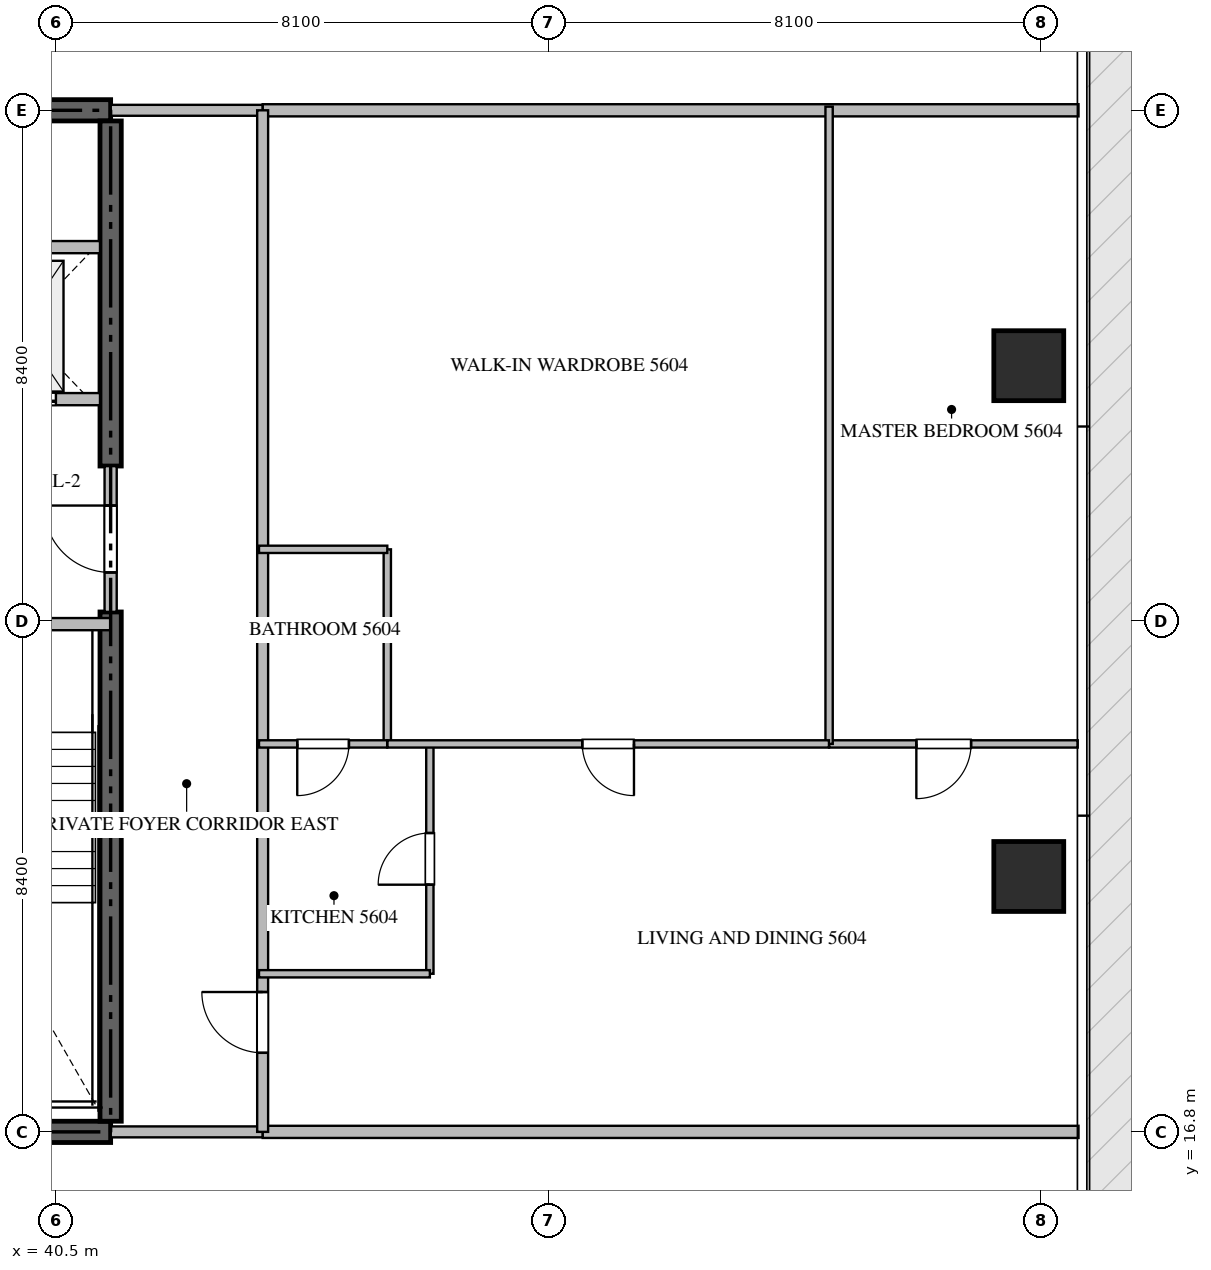
"""IFC4 building model, lengths in metres.
Left out: names, types, materials, properties, quantities, classifications, styles, units other than length and angle.
Written with IfcOpenShell. Run it as: python <this file> out.ifc"""

import sys

from ifc_helpers import new_model, si_unit, direction, frame, frame_2d, origin, origin_2d, place, context, subcontext, project, spatial, rectangle, extrude, source, transform, mapped, element, fill, save


model = new_model("IFC4")
c1 = context("Model", 3, precision=1e-05, world=origin(), true_north=direction((0.0, 1.0)))
c2 = subcontext(c1, "Body", "Model", "MODEL_VIEW")
j1 = project(units=[si_unit("LENGTHUNIT", "METRE"), si_unit("PLANEANGLEUNIT", "RADIAN")], contexts=[c1])
p1 = place(None, origin())
s1 = spatial("IfcSite", under=j1, at=p1, CompositionType="ELEMENT")
p2 = place(p1, origin())
s2 = spatial("IfcBuilding", under=s1, at=p2, CompositionType="ELEMENT")
p3 = place(p2, frame((0.0, 0.0, 225.85)))
s3 = spatial("IfcBuildingStorey", under=s2, at=p3, CompositionType="ELEMENT", Elevation=225.85)
for number, where, z_axis, x_axis in (
    (1, (23.4, 16.8, -0.26), (0.0, 0.0, 1.0), (1.0, 0.0, 0.0)),
    (2, (41.4, 33.6, -0.26), (0.0, 0.0, 1.0), (-1.0, 0.0, 0.0)),
):
    element("IfcWall", number, at=place(p3, frame(where, z_axis=z_axis, x_axis=x_axis)), inside=s3, PredefinedType="SHEAR", context=c2, shape_type="SweptSolid", body=[
        extrude(rectangle(XDim=18.0, YDim=0.35, at=frame_2d((9.0, 0.0))), origin(), (0.0, 0.0, 1.0), 3.848),
    ])
p4 = place(p3, frame((41.4, 16.975, -0.26), z_axis=(0.0, 0.0, 1.0), x_axis=(0.0, 1.0, 0.0)))
e3 = element("IfcWall", 3, at=p4, inside=s3, PredefinedType="SHEAR", context=c2, shape_type="SweptSolid", body=[
    extrude(rectangle(XDim=8.375, YDim=0.35, at=frame_2d((4.188, 0.0))), origin(), (0.0, 0.0, 1.0), 3.848),
])
p5 = place(p3, frame((41.4, 27.75, -0.26), z_axis=(0.0, 0.0, 1.0), x_axis=(0.0, 1.0, 0.0)))
e4 = element("IfcWall", 4, at=p5, inside=s3, PredefinedType="SHEAR", context=c2, shape_type="SweptSolid", body=[
    extrude(rectangle(XDim=5.675, YDim=0.35, at=frame_2d((2.837, 0.0))), origin(), (0.0, 0.0, 1.0), 3.848),
])
m1 = source(origin(), c2, "Body", "SweptSolid", [
    extrude(rectangle(XDim=1.15, YDim=1.15, at=origin_2d()), origin(), (0.0, 0.0, 1.0), 3.85),
])
for number, where, z_axis, x_axis in (
    (5, (56.5, 21.0, -0.26), (0.0, 0.0, 1.0), (1.0, 0.0, 0.0)),
    (6, (56.5, 29.4, -0.26), (0.0, 0.0, 1.0), (1.0, 0.0, 0.0)),
):
    element("IfcColumn", number, at=place(p3, frame(where, z_axis=z_axis, x_axis=x_axis)), inside=s3, PredefinedType="COLUMN", context=c2, shape_type="MappedRepresentation", body=[
        mapped(m1, transform((0.0, 0.0, 0.0), scale=1.0)),
    ])
p6 = place(p3, frame((36.95, 25.15, 0.0), z_axis=(0.0, 0.0, 1.0), x_axis=(1.0, 0.0, 0.0)))
e7 = element("IfcWall", 7, at=p6, inside=s3, PredefinedType="STANDARD", context=c2, shape_type="SweptSolid", body=[
    extrude(rectangle(XDim=4.45, YDim=0.2, at=frame_2d((2.225, 0.0))), origin(), (0.0, 0.0, 1.0), 3.59),
])
p7 = place(p6, frame((1.65, 0.0, 0.0)))
e8 = element("IfcOpeningElement", 8, at=p7, cuts=e7, PredefinedType="OPENING", context=c2, shape_type="SweptSolid", body=[
    extrude(rectangle(XDim=1.1, YDim=2.15, at=frame_2d((0.55, 1.075))), frame((0.0, 0.11, 0.0), z_axis=(0.0, -1.0, 0.0), x_axis=(1.0, 0.0, 0.0)), (0.0, 0.0, 1.0), 0.22),
])
p8 = place(p3, frame((38.75, 28.85, 0.0), z_axis=(0.0, 0.0, 1.0), x_axis=(1.0, 0.0, 0.0)))
e9 = element("IfcWall", 9, at=p8, inside=s3, PredefinedType="STANDARD", context=c2, shape_type="SweptSolid", body=[
    extrude(rectangle(XDim=2.475, YDim=0.2, at=frame_2d((1.238, 0.0))), origin(), (0.0, 0.0, 1.0), 3.59),
])
p9 = place(p8, frame((0.55, 0.0, 0.0)))
e10 = element("IfcOpeningElement", 10, at=p9, cuts=e9, PredefinedType="OPENING", context=c2, shape_type="SweptSolid", body=[
    extrude(rectangle(XDim=1.2, YDim=2.2, at=frame_2d((0.6, 1.1))), frame((0.0, 0.11, 0.0), z_axis=(0.0, -1.0, 0.0), x_axis=(1.0, 0.0, 0.0)), (0.0, 0.0, 1.0), 0.22),
])
p10 = place(p3, frame((38.75, 31.35, 0.0), z_axis=(0.0, 0.0, 1.0), x_axis=(1.0, 0.0, 0.0)))
e11 = element("IfcWall", 11, at=p10, inside=s3, PredefinedType="STANDARD", context=c2, shape_type="SweptSolid", body=[
    extrude(rectangle(XDim=2.475, YDim=0.2, at=frame_2d((1.238, 0.0))), origin(), (0.0, 0.0, 1.0), 3.59),
])
p11 = place(p3, frame((41.4, 25.352, 0.0), z_axis=(0.0, 0.0, 1.0), x_axis=(0.0, 1.0, 0.0)))
e12 = element("IfcWall", 12, at=p11, inside=s3, PredefinedType="STANDARD", context=c2, shape_type="SweptSolid", body=[
    extrude(rectangle(XDim=2.396, YDim=0.2, at=frame_2d((1.198, 0.0))), origin(), (0.0, 0.0, 1.0), 3.59),
])
p12 = place(p11, frame((0.648, 0.0, 0.0)))
e13 = element("IfcOpeningElement", 13, at=p12, cuts=e12, PredefinedType="OPENING", context=c2, shape_type="SweptSolid", body=[
    extrude(rectangle(XDim=1.1, YDim=2.15, at=frame_2d((0.55, 1.075))), frame((0.0, 0.11, 0.0), z_axis=(0.0, -1.0, 0.0), x_axis=(1.0, 0.0, 0.0)), (0.0, 0.0, 1.0), 0.22),
])
for number, where, z_axis, x_axis in (
    (14, (43.9, 16.8, 0.0), (0.0, 0.0, 1.0), (1.0, 0.0, 0.0)),
    (15, (43.9, 33.6, 0.0), (0.0, 0.0, 1.0), (1.0, 0.0, 0.0)),
):
    element("IfcWall", number, at=place(p3, frame(where, z_axis=z_axis, x_axis=x_axis)), inside=s3, PredefinedType="PARTITIONING", context=c2, shape_type="SweptSolid", body=[
        extrude(rectangle(XDim=13.418, YDim=0.2, at=frame_2d((6.709, 0.0))), origin(), (0.0, 0.0, 1.0), 3.59),
    ])
for number, where, z_axis, x_axis in (
    (16, (41.402, 16.8, 0.0), (0.0, 0.0, 1.0), (1.0, 0.0, 0.0)),
    (17, (41.402, 33.6, 0.0), (0.0, 0.0, 1.0), (1.0, 0.0, 0.0)),
):
    element("IfcWall", number, at=place(p3, frame(where, z_axis=z_axis, x_axis=x_axis)), inside=s3, PredefinedType="PARTITIONING", context=c2, shape_type="SweptSolid", body=[
        extrude(rectangle(XDim=2.496, YDim=0.18, at=frame_2d((1.248, 0.0))), origin(), (0.0, 0.0, 1.0), 3.59),
    ])
p13 = place(p3, frame((43.9, 16.8, 0.0), z_axis=(0.0, 0.0, 1.0), x_axis=(0.0, 1.0, 0.0)))
e18 = element("IfcWall", 18, at=p13, inside=s3, PredefinedType="PARTITIONING", context=c2, shape_type="SweptSolid", body=[
    extrude(rectangle(XDim=16.8, YDim=0.18, at=frame_2d((8.4, 0.0))), origin(), (0.0, 0.0, 1.0), 3.59),
])
p14 = place(p13, frame((1.3, 0.0, 0.0)))
e19 = element("IfcOpeningElement", 19, at=p14, cuts=e18, PredefinedType="OPENING", context=c2, shape_type="SweptSolid", body=[
    extrude(rectangle(XDim=1.0, YDim=2.15, at=frame_2d((0.5, 1.075))), frame((0.0, 0.1, 0.0), z_axis=(0.0, -1.0, 0.0), x_axis=(1.0, 0.0, 0.0)), (0.0, 0.0, 1.0), 0.2),
])
p15 = place(p3, frame((46.65, 19.4, 0.0), z_axis=(0.0, 0.0, 1.0), x_axis=(0.0, 1.0, 0.0)))
e20 = element("IfcWall", 20, at=p15, inside=s3, PredefinedType="PARTITIONING", context=c2, shape_type="SweptSolid", body=[
    extrude(rectangle(XDim=3.78, YDim=0.12, at=frame_2d((1.89, 0.0))), origin(), (0.0, 0.0, 1.0), 3.59),
])
p16 = place(p15, frame((1.465, 0.0, 0.0)))
e21 = element("IfcOpeningElement", 21, at=p16, cuts=e20, PredefinedType="OPENING", context=c2, shape_type="SweptSolid", body=[
    extrude(rectangle(XDim=0.85, YDim=2.1, at=frame_2d((0.425, 1.05))), frame((0.0, 0.07, 0.0), z_axis=(0.0, -1.0, 0.0), x_axis=(1.0, 0.0, 0.0)), (0.0, 0.0, 1.0), 0.14),
])
p17 = place(p3, frame((46.65, 19.4, 0.0), z_axis=(0.0, 0.0, 1.0), x_axis=(-1.0, 0.0, 0.0)))
e22 = element("IfcWall", 22, at=p17, inside=s3, PredefinedType="PARTITIONING", context=c2, shape_type="SweptSolid", body=[
    extrude(rectangle(XDim=2.81, YDim=0.12, at=frame_2d((1.405, 0.0))), origin(), (0.0, 0.0, 1.0), 3.59),
])
p18 = place(p3, frame((57.305, 23.18, 0.0), z_axis=(0.0, 0.0, 1.0), x_axis=(-1.0, 0.0, 0.0)))
e23 = element("IfcWall", 23, at=p18, inside=s3, PredefinedType="PARTITIONING", context=c2, shape_type="SweptSolid", body=[
    extrude(rectangle(XDim=4.089, YDim=0.12, at=frame_2d((2.044, 0.0))), origin(), (0.0, 0.0, 1.0), 3.59),
])
p19 = place(p18, frame((1.754, 0.0, 0.0)))
e24 = element("IfcOpeningElement", 24, at=p19, cuts=e23, PredefinedType="OPENING", context=c2, shape_type="SweptSolid", body=[
    extrude(rectangle(XDim=0.9, YDim=2.1, at=frame_2d((0.45, 1.05))), frame((0.0, 0.07, 0.0), z_axis=(0.0, -1.0, 0.0), x_axis=(1.0, 0.0, 0.0)), (0.0, 0.0, 1.0), 0.14),
])
p20 = place(p3, frame((53.216, 23.18, 0.0), z_axis=(0.0, 0.0, 1.0), x_axis=(0.0, 1.0, 0.0)))
e25 = element("IfcWall", 25, at=p20, inside=s3, PredefinedType="PARTITIONING", context=c2, shape_type="SweptSolid", body=[
    extrude(rectangle(XDim=10.48, YDim=0.12, at=frame_2d((5.24, 0.0))), origin(), (0.0, 0.0, 1.0), 3.59),
])
p21 = place(p3, frame((45.95, 23.18, 0.0), z_axis=(0.0, 0.0, 1.0), x_axis=(0.0, 1.0, 0.0)))
e26 = element("IfcWall", 26, at=p21, inside=s3, PredefinedType="PARTITIONING", context=c2, shape_type="SweptSolid", body=[
    extrude(rectangle(XDim=3.2, YDim=0.12, at=frame_2d((1.6, 0.0))), origin(), (0.0, 0.0, 1.0), 3.59),
])
p22 = place(p3, frame((45.95, 26.38, 0.0), z_axis=(0.0, 0.0, 1.0), x_axis=(-1.0, 0.0, 0.0)))
e27 = element("IfcWall", 27, at=p22, inside=s3, PredefinedType="PARTITIONING", context=c2, shape_type="SweptSolid", body=[
    extrude(rectangle(XDim=2.11, YDim=0.12, at=frame_2d((1.055, 0.0))), origin(), (0.0, 0.0, 1.0), 3.59),
])
p23 = place(p3, frame((53.214, 23.18, 0.0), z_axis=(0.0, 0.0, 1.0), x_axis=(-1.0, 0.0, 0.0)))
e28 = element("IfcWall", 28, at=p23, inside=s3, PredefinedType="PARTITIONING", context=c2, shape_type="SweptSolid", body=[
    extrude(rectangle(XDim=7.264, YDim=0.12, at=frame_2d((3.632, 0.0))), origin(), (0.0, 0.0, 1.0), 3.59),
])
p24 = place(p23, frame((3.207, 0.0, 0.0)))
e29 = element("IfcOpeningElement", 29, at=p24, cuts=e28, PredefinedType="OPENING", context=c2, shape_type="SweptSolid", body=[
    extrude(rectangle(XDim=0.85, YDim=2.1, at=frame_2d((0.425, 1.05))), frame((0.0, 0.07, 0.0), z_axis=(0.0, -1.0, 0.0), x_axis=(1.0, 0.0, 0.0)), (0.0, 0.0, 1.0), 0.14),
])
p25 = place(p3, frame((45.948, 23.18, 0.0), z_axis=(0.0, 0.0, 1.0), x_axis=(-1.0, 0.0, 0.0)))
e30 = element("IfcWall", 30, at=p25, inside=s3, PredefinedType="PARTITIONING", context=c2, shape_type="SweptSolid", body=[
    extrude(rectangle(XDim=2.108, YDim=0.12, at=frame_2d((1.054, 0.0))), origin(), (0.0, 0.0, 1.0), 3.59),
])
p26 = place(p25, frame((0.629, 0.0, 0.0)))
e31 = element("IfcOpeningElement", 31, at=p26, cuts=e30, PredefinedType="OPENING", context=c2, shape_type="SweptSolid", body=[
    extrude(rectangle(XDim=0.85, YDim=2.1, at=frame_2d((0.425, 1.05))), frame((0.0, 0.07, 0.0), z_axis=(0.0, -1.0, 0.0), x_axis=(1.0, 0.0, 0.0)), (0.0, 0.0, 1.0), 0.14),
])
m2 = source(origin(), c2, "Body", "SweptSolid", [
    extrude(rectangle(XDim=1.2, YDim=2.2, at=frame_2d((0.6, 1.1))), frame((0.0, 0.025, 0.0), z_axis=(0.0, -1.0, 0.0), x_axis=(1.0, 0.0, 0.0)), (0.0, 0.0, 1.0), 0.05),
])
p27 = place(p9, origin())
e32 = element("IfcDoor", 32, at=p27, inside=s3, OperationType="DOUBLE_DOOR_SLIDING", PredefinedType="DOOR", context=c2, shape_type="MappedRepresentation", body=[
    mapped(m2, transform((0.0, 0.0, 0.0), scale=1.0)),
])
fill(e10, e32)
m3 = source(origin(), c2, "Body", "SweptSolid", [
    extrude(rectangle(XDim=1.1, YDim=2.15, at=frame_2d((0.55, 1.075))), frame((0.0, 0.025, 0.0), z_axis=(0.0, -1.0, 0.0), x_axis=(1.0, 0.0, 0.0)), (0.0, 0.0, 1.0), 0.05),
])
p28 = place(p12, origin())
e33 = element("IfcDoor", 33, at=p28, inside=s3, OperationType="SINGLE_SWING_RIGHT", PredefinedType="DOOR", context=c2, shape_type="MappedRepresentation", body=[
    mapped(m3, transform((0.0, 0.0, 0.0), scale=1.0)),
])
fill(e13, e33)
m4 = source(origin(), c2, "Body", "SweptSolid", [
    extrude(rectangle(XDim=1.0, YDim=2.15, at=frame_2d((0.5, 1.075))), frame((0.0, 0.025, 0.0), z_axis=(0.0, -1.0, 0.0), x_axis=(1.0, 0.0, 0.0)), (0.0, 0.0, 1.0), 0.05),
])
p29 = place(p14, origin())
e34 = element("IfcDoor", 34, at=p29, inside=s3, OperationType="SINGLE_SWING_RIGHT", PredefinedType="DOOR", context=c2, shape_type="MappedRepresentation", body=[
    mapped(m4, transform((0.0, 0.0, 0.0), scale=1.0)),
])
fill(e19, e34)
m5 = source(origin(), c2, "Body", "SweptSolid", [
    extrude(rectangle(XDim=0.85, YDim=2.1, at=frame_2d((0.425, 1.05))), frame((0.0, 0.025, 0.0), z_axis=(0.0, -1.0, 0.0), x_axis=(1.0, 0.0, 0.0)), (0.0, 0.0, 1.0), 0.05),
])
p30 = place(p16, origin())
e35 = element("IfcDoor", 35, at=p30, inside=s3, OperationType="SINGLE_SWING_LEFT", PredefinedType="DOOR", context=c2, shape_type="MappedRepresentation", body=[
    mapped(m5, transform((0.0, 0.0, 0.0), scale=1.0)),
])
fill(e21, e35)
m6 = source(origin(), c2, "Body", "SweptSolid", [
    extrude(rectangle(XDim=0.9, YDim=2.1, at=frame_2d((0.45, 1.05))), frame((0.0, 0.025, 0.0), z_axis=(0.0, -1.0, 0.0), x_axis=(1.0, 0.0, 0.0)), (0.0, 0.0, 1.0), 0.05),
])
p31 = place(p19, origin())
e36 = element("IfcDoor", 36, at=p31, inside=s3, OperationType="SINGLE_SWING_RIGHT", PredefinedType="DOOR", context=c2, shape_type="MappedRepresentation", body=[
    mapped(m6, transform((0.0, 0.0, 0.0), scale=1.0)),
])
fill(e24, e36)
p32 = place(p24, origin())
e37 = element("IfcDoor", 37, at=p32, inside=s3, OperationType="SINGLE_SWING_LEFT", PredefinedType="DOOR", context=c2, shape_type="MappedRepresentation", body=[
    mapped(m5, transform((0.0, 0.0, 0.0), scale=1.0)),
])
fill(e29, e37)
p33 = place(p26, origin())
e38 = element("IfcDoor", 38, at=p33, inside=s3, OperationType="SINGLE_SWING_RIGHT", PredefinedType="DOOR", context=c2, shape_type="MappedRepresentation", body=[
    mapped(m5, transform((0.0, 0.0, 0.0), scale=1.0)),
])
fill(e31, e38)
save(model, sys.argv[1])
